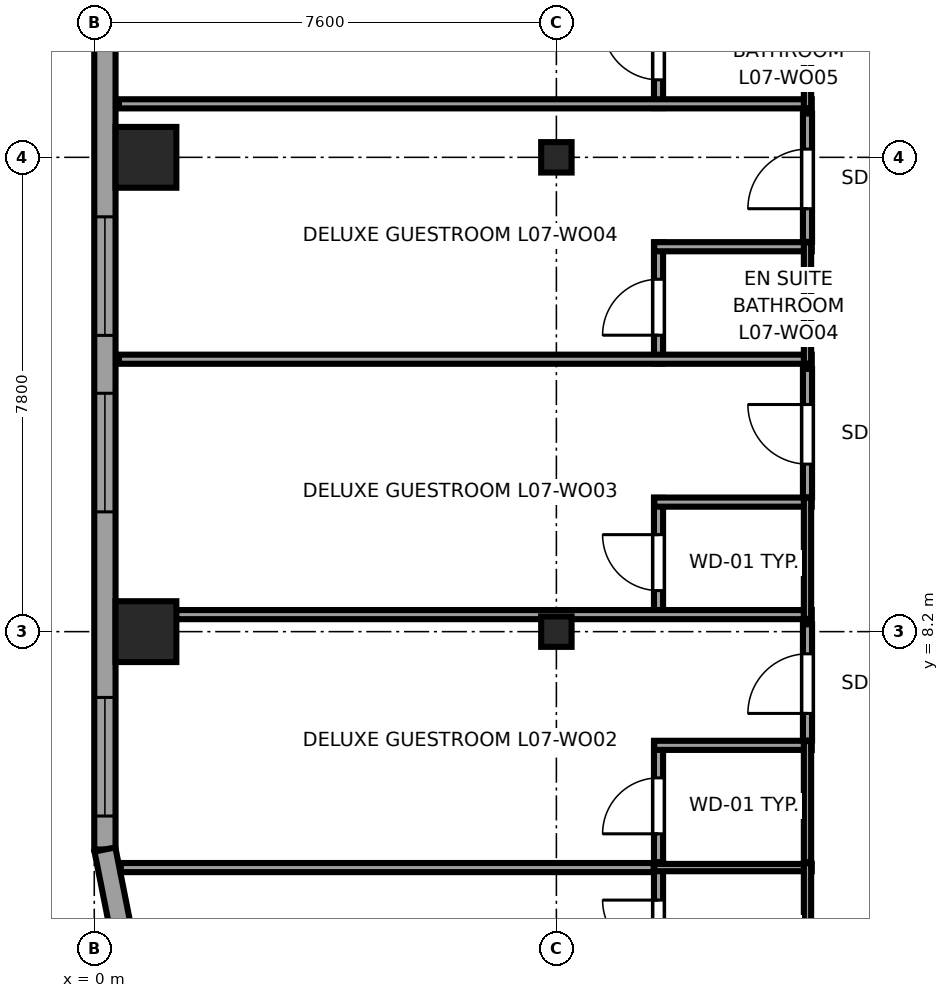
"""IFC4 building model, lengths in metres.
Left out: names, types, materials, properties, quantities, classifications, styles, units other than length and angle.
Written with IfcOpenShell. Run it as: python <this file> out.ifc"""

import sys

from ifc_helpers import new_model, si_unit, direction, frame, frame_2d, origin, origin_2d, place, context, subcontext, project, spatial, rectangle, i_section, extrude, source, transform, mapped, element, fill, save


model = new_model("IFC4")
c1 = context("Model", 3, precision=1e-05, world=origin(), true_north=direction((0.0, 1.0)))
c2 = subcontext(c1, "Body", "Model", "MODEL_VIEW")
j1 = project(units=[si_unit("LENGTHUNIT", "METRE"), si_unit("PLANEANGLEUNIT", "RADIAN")], contexts=[c1])
p1 = place(None, origin())
s1 = spatial("IfcSite", under=j1, at=p1, CompositionType="ELEMENT")
p2 = place(p1, origin())
s2 = spatial("IfcBuilding", under=s1, at=p2, CompositionType="ELEMENT")
p3 = place(p2, frame((0.0, 0.0, 35.55)))
s3 = spatial("IfcBuildingStorey", under=s2, at=p3, CompositionType="ELEMENT", Elevation=35.55)
m1 = source(origin(), c2, "Body", "SweptSolid", [
    extrude(rectangle(XDim=1.0, YDim=1.0, at=origin_2d()), origin(), (0.0, 0.0, 1.0), 3.55),
])
for number, where, z_axis, x_axis in (
    (1, (0.85, 8.2, 0.0), (0.0, 0.0, 1.0), (1.0, 0.0, 0.0)),
    (2, (0.85, 16.0, 0.0), (0.0, 0.0, 1.0), (1.0, 0.0, 0.0)),
):
    element("IfcColumn", number, at=place(p3, frame(where, z_axis=z_axis, x_axis=x_axis)), inside=s3, PredefinedType="COLUMN", context=c2, shape_type="MappedRepresentation", body=[
        mapped(m1, transform((0.0, 0.0, 0.0), x_axis=(1.0, 0.0, 0.0), y_axis=(0.0, 1.0, 0.0), z_axis=(0.0, 0.0, 1.0), scale=1.0)),
    ])
m2 = source(origin(), c2, "Body", "SweptSolid", [
    extrude(i_section(OverallWidth=0.5, OverallDepth=0.5, WebThickness=0.028, FlangeThickness=0.045, at=origin_2d()), origin(), (0.0, 0.0, 1.0), 3.55),
])
for number, where, z_axis, x_axis in (
    (3, (7.6, 8.2, 0.0), (0.0, 0.0, 1.0), (1.0, 0.0, 0.0)),
    (4, (7.6, 16.0, 0.0), (0.0, 0.0, 1.0), (1.0, 0.0, 0.0)),
):
    element("IfcColumn", number, at=place(p3, frame(where, z_axis=z_axis, x_axis=x_axis)), inside=s3, PredefinedType="COLUMN", context=c2, shape_type="MappedRepresentation", body=[
        mapped(m2, transform((0.0, 0.0, 0.0), x_axis=(1.0, 0.0, 0.0), y_axis=(0.0, 1.0, 0.0), z_axis=(0.0, 0.0, 1.0), scale=1.0)),
    ])
p4 = place(p3, frame((0.175, 41.383, 0.0), z_axis=(0.0, 0.0, 1.0), x_axis=(0.0, -1.0, 0.0)))
e5 = element("IfcWall", 5, at=p4, inside=s3, PredefinedType="SOLIDWALL", context=c2, shape_type="SweptSolid", body=[
    extrude(rectangle(XDim=36.766, YDim=0.35, at=frame_2d((18.383, 0.0))), origin(), (0.0, 0.0, 1.0), 3.37),
])
p5 = place(p4, frame((1.601, 0.0, 0.68)))
e6 = element("IfcOpeningElement", 6, at=p5, cuts=e5, PredefinedType="OPENING", context=c2, shape_type="SweptSolid", body=[
    extrude(rectangle(XDim=1.95, YDim=1.82, at=frame_2d((0.975, 0.91))), frame((0.0, 0.185, 0.0), z_axis=(0.0, -1.0, 0.0), x_axis=(1.0, 0.0, 0.0)), (0.0, 0.0, 1.0), 0.37),
])
p6 = place(p4, frame((4.503, 0.0, 0.68)))
e7 = element("IfcOpeningElement", 7, at=p6, cuts=e5, PredefinedType="OPENING", context=c2, shape_type="SweptSolid", body=[
    extrude(rectangle(XDim=1.95, YDim=1.82, at=frame_2d((0.975, 0.91))), frame((0.0, 0.185, 0.0), z_axis=(0.0, -1.0, 0.0), x_axis=(1.0, 0.0, 0.0)), (0.0, 0.0, 1.0), 0.37),
])
p7 = place(p4, frame((13.456, 0.0, 0.68)))
e8 = element("IfcOpeningElement", 8, at=p7, cuts=e5, PredefinedType="OPENING", context=c2, shape_type="SweptSolid", body=[
    extrude(rectangle(XDim=1.95, YDim=1.82, at=frame_2d((0.975, 0.91))), frame((0.0, 0.185, 0.0), z_axis=(0.0, -1.0, 0.0), x_axis=(1.0, 0.0, 0.0)), (0.0, 0.0, 1.0), 0.37),
])
p8 = place(p4, frame((21.36, 0.0, 0.68)))
e9 = element("IfcOpeningElement", 9, at=p8, cuts=e5, PredefinedType="OPENING", context=c2, shape_type="SweptSolid", body=[
    extrude(rectangle(XDim=1.95, YDim=1.82, at=frame_2d((0.975, 0.91))), frame((0.0, 0.185, 0.0), z_axis=(0.0, -1.0, 0.0), x_axis=(1.0, 0.0, 0.0)), (0.0, 0.0, 1.0), 0.37),
])
p9 = place(p4, frame((26.361, 0.0, 0.68)))
e10 = element("IfcOpeningElement", 10, at=p9, cuts=e5, PredefinedType="OPENING", context=c2, shape_type="SweptSolid", body=[
    extrude(rectangle(XDim=1.95, YDim=1.82, at=frame_2d((0.975, 0.91))), frame((0.0, 0.185, 0.0), z_axis=(0.0, -1.0, 0.0), x_axis=(1.0, 0.0, 0.0)), (0.0, 0.0, 1.0), 0.37),
])
p10 = place(p4, frame((29.263, 0.0, 0.68)))
e11 = element("IfcOpeningElement", 11, at=p10, cuts=e5, PredefinedType="OPENING", context=c2, shape_type="SweptSolid", body=[
    extrude(rectangle(XDim=1.95, YDim=1.82, at=frame_2d((0.975, 0.91))), frame((0.0, 0.185, 0.0), z_axis=(0.0, -1.0, 0.0), x_axis=(1.0, 0.0, 0.0)), (0.0, 0.0, 1.0), 0.37),
])
p11 = place(p4, frame((34.265, 0.0, 0.68)))
e12 = element("IfcOpeningElement", 12, at=p11, cuts=e5, PredefinedType="OPENING", context=c2, shape_type="SweptSolid", body=[
    extrude(rectangle(XDim=1.95, YDim=1.82, at=frame_2d((0.975, 0.91))), frame((0.0, 0.185, 0.0), z_axis=(0.0, -1.0, 0.0), x_axis=(1.0, 0.0, 0.0)), (0.0, 0.0, 1.0), 0.37),
])
p12 = place(p3, frame((0.175, 4.617, 0.0), z_axis=(0.0, 0.0, 1.0), x_axis=(0.195011420161, -0.980800971659, 0.0)))
e13 = element("IfcWall", 13, at=p12, inside=s3, PredefinedType="SOLIDWALL", context=c2, shape_type="SweptSolid", body=[
    extrude(rectangle(XDim=1.743, YDim=0.35, at=frame_2d((0.871, 0.0))), origin(), (0.0, 0.0, 1.0), 3.37),
])
p13 = place(p3, frame((9.28, 2.4, 0.0), z_axis=(0.0, 0.0, 1.0), x_axis=(0.0, 1.0, 0.0)))
e14 = element("IfcWall", 14, at=p13, inside=s3, PredefinedType="PARTITIONING", context=c2, shape_type="SweptSolid", body=[
    extrude(rectangle(XDim=1.99, YDim=0.15, at=frame_2d((0.995, 0.0))), origin(), (0.0, 0.0, 1.0), 3.37),
])
p14 = place(p13, frame((0.465, 0.0, 0.0)))
e15 = element("IfcOpeningElement", 15, at=p14, cuts=e14, PredefinedType="OPENING", context=c2, shape_type="SweptSolid", body=[
    extrude(rectangle(XDim=0.92, YDim=2.01, at=frame_2d((0.46, 1.005))), frame((0.0, 0.085, 0.0), z_axis=(0.0, -1.0, 0.0), x_axis=(1.0, 0.0, 0.0)), (0.0, 0.0, 1.0), 0.17),
])
p15 = place(p3, frame((9.21, 4.32, 0.0), z_axis=(0.0, 0.0, 1.0), x_axis=(1.0, 0.0, 0.0)))
e16 = element("IfcWall", 16, at=p15, inside=s3, PredefinedType="PLUMBINGWALL", context=c2, shape_type="SweptSolid", body=[
    extrude(rectangle(XDim=2.59, YDim=0.12, at=frame_2d((1.295, 0.0))), origin(), (0.0, 0.0, 1.0), 3.37),
])
p16 = place(p3, frame((11.73, 2.4, 0.0), z_axis=(0.0, 0.0, 1.0), x_axis=(0.0, 1.0, 0.0)))
e17 = element("IfcWall", 17, at=p16, inside=s3, PredefinedType="PLUMBINGWALL", context=c2, shape_type="SweptSolid", body=[
    extrude(rectangle(XDim=1.99, YDim=0.12, at=frame_2d((0.995, 0.0))), origin(), (0.0, 0.0, 1.0), 3.37),
])
p17 = place(p3, frame((9.28, 4.41, 0.0), z_axis=(0.0, 0.0, 1.0), x_axis=(0.0, 1.0, 0.0)))
e18 = element("IfcWall", 18, at=p17, inside=s3, PredefinedType="PARTITIONING", context=c2, shape_type="SweptSolid", body=[
    extrude(rectangle(XDim=1.99, YDim=0.15, at=frame_2d((0.995, 0.0))), origin(), (0.0, 0.0, 1.0), 3.37),
])
p18 = place(p17, frame((0.465, 0.0, 0.0)))
e19 = element("IfcOpeningElement", 19, at=p18, cuts=e18, PredefinedType="OPENING", context=c2, shape_type="SweptSolid", body=[
    extrude(rectangle(XDim=0.92, YDim=2.01, at=frame_2d((0.46, 1.005))), frame((0.0, 0.085, 0.0), z_axis=(0.0, -1.0, 0.0), x_axis=(1.0, 0.0, 0.0)), (0.0, 0.0, 1.0), 0.17),
])
p19 = place(p3, frame((9.21, 6.33, 0.0), z_axis=(0.0, 0.0, 1.0), x_axis=(1.0, 0.0, 0.0)))
e20 = element("IfcWall", 20, at=p19, inside=s3, PredefinedType="PARTITIONING", context=c2, shape_type="SweptSolid", body=[
    extrude(rectangle(XDim=2.59, YDim=0.15, at=frame_2d((1.295, 0.0))), origin(), (0.0, 0.0, 1.0), 3.37),
])
p20 = place(p3, frame((11.73, 4.41, 0.0), z_axis=(0.0, 0.0, 1.0), x_axis=(0.0, 1.0, 0.0)))
e21 = element("IfcWall", 21, at=p20, inside=s3, PredefinedType="PLUMBINGWALL", context=c2, shape_type="SweptSolid", body=[
    extrude(rectangle(XDim=1.99, YDim=0.12, at=frame_2d((0.995, 0.0))), origin(), (0.0, 0.0, 1.0), 3.37),
])
p21 = place(p3, frame((9.28, 8.41, 0.0), z_axis=(0.0, 0.0, 1.0), x_axis=(0.0, 1.0, 0.0)))
e22 = element("IfcWall", 22, at=p21, inside=s3, PredefinedType="PARTITIONING", context=c2, shape_type="SweptSolid", body=[
    extrude(rectangle(XDim=1.99, YDim=0.15, at=frame_2d((0.995, 0.0))), origin(), (0.0, 0.0, 1.0), 3.37),
])
p22 = place(p21, frame((0.465, 0.0, 0.0)))
e23 = element("IfcOpeningElement", 23, at=p22, cuts=e22, PredefinedType="OPENING", context=c2, shape_type="SweptSolid", body=[
    extrude(rectangle(XDim=0.92, YDim=2.01, at=frame_2d((0.46, 1.005))), frame((0.0, 0.085, 0.0), z_axis=(0.0, -1.0, 0.0), x_axis=(1.0, 0.0, 0.0)), (0.0, 0.0, 1.0), 0.17),
])
p23 = place(p3, frame((0.405, 8.48, 0.0), z_axis=(0.0, 0.0, 1.0), x_axis=(1.0, 0.0, 0.0)))
e24 = element("IfcWall", 24, at=p23, inside=s3, PredefinedType="PARTITIONING", context=c2, shape_type="SweptSolid", body=[
    extrude(rectangle(XDim=11.395, YDim=0.15, at=frame_2d((5.698, 0.0))), origin(), (0.0, 0.0, 1.0), 3.37),
])
p24 = place(p3, frame((9.21, 10.33, 0.0), z_axis=(0.0, 0.0, 1.0), x_axis=(1.0, 0.0, 0.0)))
e25 = element("IfcWall", 25, at=p24, inside=s3, PredefinedType="PARTITIONING", context=c2, shape_type="SweptSolid", body=[
    extrude(rectangle(XDim=2.59, YDim=0.15, at=frame_2d((1.295, 0.0))), origin(), (0.0, 0.0, 1.0), 3.37),
])
p25 = place(p3, frame((11.73, 8.41, 0.0), z_axis=(0.0, 0.0, 1.0), x_axis=(0.0, 1.0, 0.0)))
e26 = element("IfcWall", 26, at=p25, inside=s3, PredefinedType="PLUMBINGWALL", context=c2, shape_type="SweptSolid", body=[
    extrude(rectangle(XDim=1.99, YDim=0.12, at=frame_2d((0.995, 0.0))), origin(), (0.0, 0.0, 1.0), 3.37),
])
p26 = place(p3, frame((9.28, 12.61, 0.0), z_axis=(0.0, 0.0, 1.0), x_axis=(0.0, 1.0, 0.0)))
e27 = element("IfcWall", 27, at=p26, inside=s3, PredefinedType="PARTITIONING", context=c2, shape_type="SweptSolid", body=[
    extrude(rectangle(XDim=1.99, YDim=0.15, at=frame_2d((0.995, 0.0))), origin(), (0.0, 0.0, 1.0), 3.37),
])
p27 = place(p26, frame((0.465, 0.0, 0.0)))
e28 = element("IfcOpeningElement", 28, at=p27, cuts=e27, PredefinedType="OPENING", context=c2, shape_type="SweptSolid", body=[
    extrude(rectangle(XDim=0.92, YDim=2.01, at=frame_2d((0.46, 1.005))), frame((0.0, 0.085, 0.0), z_axis=(0.0, -1.0, 0.0), x_axis=(1.0, 0.0, 0.0)), (0.0, 0.0, 1.0), 0.17),
])
p28 = place(p3, frame((0.405, 12.68, 0.0), z_axis=(0.0, 0.0, 1.0), x_axis=(1.0, 0.0, 0.0)))
e29 = element("IfcWall", 29, at=p28, inside=s3, PredefinedType="PARTITIONING", context=c2, shape_type="SweptSolid", body=[
    extrude(rectangle(XDim=11.395, YDim=0.15, at=frame_2d((5.698, 0.0))), origin(), (0.0, 0.0, 1.0), 3.37),
])
p29 = place(p3, frame((9.21, 14.53, 0.0), z_axis=(0.0, 0.0, 1.0), x_axis=(1.0, 0.0, 0.0)))
e30 = element("IfcWall", 30, at=p29, inside=s3, PredefinedType="PARTITIONING", context=c2, shape_type="SweptSolid", body=[
    extrude(rectangle(XDim=2.59, YDim=0.15, at=frame_2d((1.295, 0.0))), origin(), (0.0, 0.0, 1.0), 3.37),
])
p30 = place(p3, frame((11.73, 12.61, 0.0), z_axis=(0.0, 0.0, 1.0), x_axis=(0.0, 1.0, 0.0)))
e31 = element("IfcWall", 31, at=p30, inside=s3, PredefinedType="PLUMBINGWALL", context=c2, shape_type="SweptSolid", body=[
    extrude(rectangle(XDim=1.99, YDim=0.12, at=frame_2d((0.995, 0.0))), origin(), (0.0, 0.0, 1.0), 3.37),
])
p31 = place(p3, frame((9.28, 16.81, 0.0), z_axis=(0.0, 0.0, 1.0), x_axis=(0.0, 1.0, 0.0)))
e32 = element("IfcWall", 32, at=p31, inside=s3, PredefinedType="PARTITIONING", context=c2, shape_type="SweptSolid", body=[
    extrude(rectangle(XDim=1.99, YDim=0.15, at=frame_2d((0.995, 0.0))), origin(), (0.0, 0.0, 1.0), 3.37),
])
p32 = place(p31, frame((0.465, 0.0, 0.0)))
e33 = element("IfcOpeningElement", 33, at=p32, cuts=e32, PredefinedType="OPENING", context=c2, shape_type="SweptSolid", body=[
    extrude(rectangle(XDim=0.92, YDim=2.01, at=frame_2d((0.46, 1.005))), frame((0.0, 0.085, 0.0), z_axis=(0.0, -1.0, 0.0), x_axis=(1.0, 0.0, 0.0)), (0.0, 0.0, 1.0), 0.17),
])
p33 = place(p3, frame((0.405, 16.88, 0.0), z_axis=(0.0, 0.0, 1.0), x_axis=(1.0, 0.0, 0.0)))
e34 = element("IfcWall", 34, at=p33, inside=s3, PredefinedType="PARTITIONING", context=c2, shape_type="SweptSolid", body=[
    extrude(rectangle(XDim=11.395, YDim=0.15, at=frame_2d((5.698, 0.0))), origin(), (0.0, 0.0, 1.0), 3.37),
])
p34 = place(p3, frame((11.73, 16.81, 0.0), z_axis=(0.0, 0.0, 1.0), x_axis=(0.0, 1.0, 0.0)))
e35 = element("IfcWall", 35, at=p34, inside=s3, PredefinedType="PLUMBINGWALL", context=c2, shape_type="SweptSolid", body=[
    extrude(rectangle(XDim=1.99, YDim=0.12, at=frame_2d((0.995, 0.0))), origin(), (0.0, 0.0, 1.0), 3.37),
])
p35 = place(p3, frame((0.437, 4.32, 0.0), z_axis=(0.0, 0.0, 1.0), x_axis=(1.0, 0.0, 0.0)))
e36 = element("IfcWall", 36, at=p35, inside=s3, PredefinedType="PARTITIONING", context=c2, shape_type="SweptSolid", body=[
    extrude(rectangle(XDim=8.763, YDim=0.15, at=frame_2d((4.381, 0.0))), origin(), (0.0, 0.0, 1.0), 3.37),
])
p36 = place(p3, frame((11.73, 6.41, 0.0), z_axis=(0.0, 0.0, 1.0), x_axis=(0.0, 1.0, 0.0)))
e37 = element("IfcWall", 37, at=p36, inside=s3, PredefinedType="PARTITIONING", context=c2, shape_type="SweptSolid", body=[
    extrude(rectangle(XDim=1.91, YDim=0.15, at=frame_2d((0.955, 0.0))), origin(), (0.0, 0.0, 1.0), 3.37),
])
p37 = place(p36, frame((0.445, 0.0, 0.0)))
e38 = element("IfcOpeningElement", 38, at=p37, cuts=e37, PredefinedType="OPENING", context=c2, shape_type="SweptSolid", body=[
    extrude(rectangle(XDim=0.98, YDim=2.12, at=frame_2d((0.49, 1.06))), frame((0.0, 0.085, 0.0), z_axis=(0.0, -1.0, 0.0), x_axis=(1.0, 0.0, 0.0)), (0.0, 0.0, 1.0), 0.17),
])
p38 = place(p3, frame((11.73, 10.41, 0.0), z_axis=(0.0, 0.0, 1.0), x_axis=(0.0, 1.0, 0.0)))
e39 = element("IfcWall", 39, at=p38, inside=s3, PredefinedType="PARTITIONING", context=c2, shape_type="SweptSolid", body=[
    extrude(rectangle(XDim=2.11, YDim=0.15, at=frame_2d((1.055, 0.0))), origin(), (0.0, 0.0, 1.0), 3.37),
])
p39 = place(p38, frame((0.545, 0.0, 0.0)))
e40 = element("IfcOpeningElement", 40, at=p39, cuts=e39, PredefinedType="OPENING", context=c2, shape_type="SweptSolid", body=[
    extrude(rectangle(XDim=0.98, YDim=2.12, at=frame_2d((0.49, 1.06))), frame((0.0, 0.085, 0.0), z_axis=(0.0, -1.0, 0.0), x_axis=(1.0, 0.0, 0.0)), (0.0, 0.0, 1.0), 0.17),
])
p40 = place(p3, frame((11.73, 14.61, 0.0), z_axis=(0.0, 0.0, 1.0), x_axis=(0.0, 1.0, 0.0)))
e41 = element("IfcWall", 41, at=p40, inside=s3, PredefinedType="PARTITIONING", context=c2, shape_type="SweptSolid", body=[
    extrude(rectangle(XDim=2.11, YDim=0.15, at=frame_2d((1.055, 0.0))), origin(), (0.0, 0.0, 1.0), 3.37),
])
p41 = place(p40, frame((0.545, 0.0, 0.0)))
e42 = element("IfcOpeningElement", 42, at=p41, cuts=e41, PredefinedType="OPENING", context=c2, shape_type="SweptSolid", body=[
    extrude(rectangle(XDim=0.98, YDim=2.12, at=frame_2d((0.49, 1.06))), frame((0.0, 0.085, 0.0), z_axis=(0.0, -1.0, 0.0), x_axis=(1.0, 0.0, 0.0)), (0.0, 0.0, 1.0), 0.17),
])
m3 = source(origin(), c2, "Body", "SweptSolid", [
    extrude(rectangle(XDim=1.95, YDim=1.82, at=frame_2d((0.975, 0.91))), frame((0.0, 0.09, 0.0), z_axis=(0.0, -1.0, 0.0), x_axis=(1.0, 0.0, 0.0)), (0.0, 0.0, 1.0), 0.06),
])
p42 = place(p9, origin())
e43 = element("IfcWindow", 43, at=p42, inside=s3, PartitioningType="DOUBLE_PANEL_VERTICAL", PredefinedType="WINDOW", context=c2, shape_type="MappedRepresentation", body=[
    mapped(m3, transform((0.0, 0.0, 0.0), x_axis=(1.0, 0.0, 0.0), y_axis=(0.0, 1.0, 0.0), z_axis=(0.0, 0.0, 1.0), scale=1.0)),
])
fill(e10, e43)
p43 = place(p10, origin())
e44 = element("IfcWindow", 44, at=p43, inside=s3, PartitioningType="DOUBLE_PANEL_VERTICAL", PredefinedType="WINDOW", context=c2, shape_type="MappedRepresentation", body=[
    mapped(m3, transform((0.0, 0.0, 0.0), x_axis=(1.0, 0.0, 0.0), y_axis=(0.0, 1.0, 0.0), z_axis=(0.0, 0.0, 1.0), scale=1.0)),
])
fill(e11, e44)
p44 = place(p11, origin())
e45 = element("IfcWindow", 45, at=p44, inside=s3, PartitioningType="DOUBLE_PANEL_VERTICAL", PredefinedType="WINDOW", context=c2, shape_type="MappedRepresentation", body=[
    mapped(m3, transform((0.0, 0.0, 0.0), x_axis=(1.0, 0.0, 0.0), y_axis=(0.0, 1.0, 0.0), z_axis=(0.0, 0.0, 1.0), scale=1.0)),
])
fill(e12, e45)
m4 = source(origin(), c2, "Body", "SweptSolid", [
    extrude(rectangle(XDim=0.92, YDim=2.01, at=frame_2d((0.46, 1.005))), frame((0.0, 0.025, 0.0), z_axis=(0.0, -1.0, 0.0), x_axis=(1.0, 0.0, 0.0)), (0.0, 0.0, 1.0), 0.05),
])
p45 = place(p14, origin())
e46 = element("IfcDoor", 46, at=p45, inside=s3, OperationType="SINGLE_SWING_RIGHT", PredefinedType="DOOR", context=c2, shape_type="MappedRepresentation", body=[
    mapped(m4, transform((0.0, 0.0, 0.0), x_axis=(1.0, 0.0, 0.0), y_axis=(0.0, 1.0, 0.0), z_axis=(0.0, 0.0, 1.0), scale=1.0)),
])
fill(e15, e46)
p46 = place(p18, origin())
e47 = element("IfcDoor", 47, at=p46, inside=s3, OperationType="SINGLE_SWING_LEFT", PredefinedType="DOOR", context=c2, shape_type="MappedRepresentation", body=[
    mapped(m4, transform((0.0, 0.0, 0.0), x_axis=(1.0, 0.0, 0.0), y_axis=(0.0, 1.0, 0.0), z_axis=(0.0, 0.0, 1.0), scale=1.0)),
])
fill(e19, e47)
p47 = place(p22, origin())
e48 = element("IfcDoor", 48, at=p47, inside=s3, OperationType="SINGLE_SWING_RIGHT", PredefinedType="DOOR", context=c2, shape_type="MappedRepresentation", body=[
    mapped(m4, transform((0.0, 0.0, 0.0), x_axis=(1.0, 0.0, 0.0), y_axis=(0.0, 1.0, 0.0), z_axis=(0.0, 0.0, 1.0), scale=1.0)),
])
fill(e23, e48)
p48 = place(p27, origin())
e49 = element("IfcDoor", 49, at=p48, inside=s3, OperationType="SINGLE_SWING_LEFT", PredefinedType="DOOR", context=c2, shape_type="MappedRepresentation", body=[
    mapped(m4, transform((0.0, 0.0, 0.0), x_axis=(1.0, 0.0, 0.0), y_axis=(0.0, 1.0, 0.0), z_axis=(0.0, 0.0, 1.0), scale=1.0)),
])
fill(e28, e49)
p49 = place(p32, origin())
e50 = element("IfcDoor", 50, at=p49, inside=s3, OperationType="SINGLE_SWING_RIGHT", PredefinedType="DOOR", context=c2, shape_type="MappedRepresentation", body=[
    mapped(m4, transform((0.0, 0.0, 0.0), x_axis=(1.0, 0.0, 0.0), y_axis=(0.0, 1.0, 0.0), z_axis=(0.0, 0.0, 1.0), scale=1.0)),
])
fill(e33, e50)
m5 = source(origin(), c2, "Body", "SweptSolid", [
    extrude(rectangle(XDim=0.98, YDim=2.12, at=frame_2d((0.49, 1.06))), frame((0.0, 0.025, 0.0), z_axis=(0.0, -1.0, 0.0), x_axis=(1.0, 0.0, 0.0)), (0.0, 0.0, 1.0), 0.05),
])
p50 = place(p37, origin())
e51 = element("IfcDoor", 51, at=p50, inside=s3, OperationType="SINGLE_SWING_LEFT", PredefinedType="DOOR", context=c2, shape_type="MappedRepresentation", body=[
    mapped(m5, transform((0.0, 0.0, 0.0), x_axis=(1.0, 0.0, 0.0), y_axis=(0.0, 1.0, 0.0), z_axis=(0.0, 0.0, 1.0), scale=1.0)),
])
fill(e38, e51)
p51 = place(p39, origin())
e52 = element("IfcDoor", 52, at=p51, inside=s3, OperationType="SINGLE_SWING_RIGHT", PredefinedType="DOOR", context=c2, shape_type="MappedRepresentation", body=[
    mapped(m5, transform((0.0, 0.0, 0.0), x_axis=(1.0, 0.0, 0.0), y_axis=(0.0, 1.0, 0.0), z_axis=(0.0, 0.0, 1.0), scale=1.0)),
])
fill(e40, e52)
p52 = place(p41, origin())
e53 = element("IfcDoor", 53, at=p52, inside=s3, OperationType="SINGLE_SWING_LEFT", PredefinedType="DOOR", context=c2, shape_type="MappedRepresentation", body=[
    mapped(m5, transform((0.0, 0.0, 0.0), x_axis=(1.0, 0.0, 0.0), y_axis=(0.0, 1.0, 0.0), z_axis=(0.0, 0.0, 1.0), scale=1.0)),
])
fill(e42, e53)
save(model, sys.argv[1])
